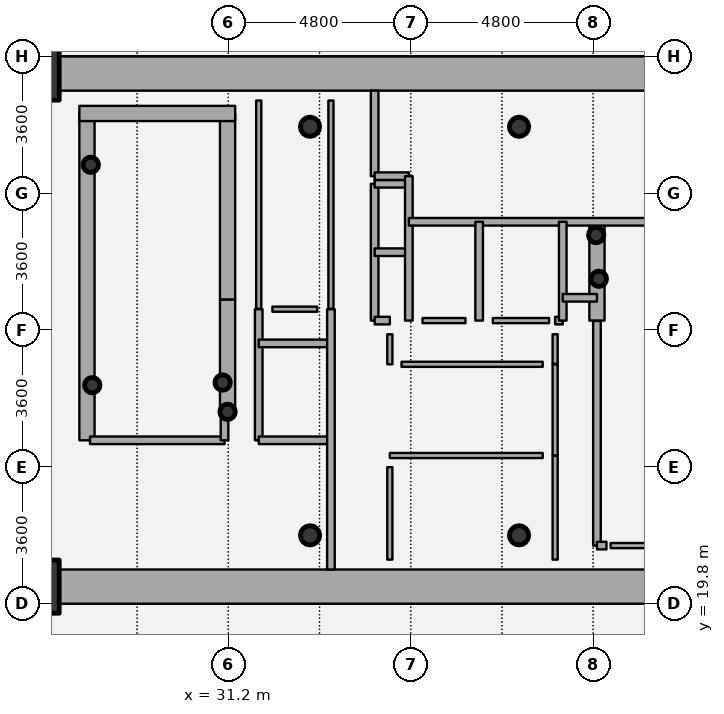
"""IFC4 building model, lengths in metres.
Left out: names, types, materials, properties, quantities, classifications, styles, units other than length and angle.
Written with IfcOpenShell. Run it as: python <this file> out.ifc"""

import sys

from ifc_helpers import new_model, si_unit, direction, frame, frame_2d, origin, origin_2d, place, context, subcontext, project, spatial, rectangle, hollow_circle, extrude, source, transform, mapped, element, fill, save


model = new_model("IFC4")
c1 = context("Model", 3, precision=1e-05, world=origin(), true_north=direction((0.0, 1.0)))
c2 = subcontext(c1, "Body", "Model", "MODEL_VIEW")
j1 = project(units=[si_unit("LENGTHUNIT", "METRE"), si_unit("PLANEANGLEUNIT", "RADIAN")], contexts=[c1])
p1 = place(None, origin())
s1 = spatial("IfcSite", under=j1, at=p1, CompositionType="ELEMENT")
p2 = place(p1, origin())
s2 = spatial("IfcBuilding", under=s1, at=p2, CompositionType="ELEMENT")
p3 = place(p2, frame((0.0, 0.0, -9.0)))
s3 = spatial("IfcBuildingStorey", under=s2, at=p3, CompositionType="ELEMENT", Elevation=-9.0)
for number, where, z_axis, x_axis in (
    (1, (26.05, 20.25, 0.0), (0.0, 0.0, 1.0), (1.0, 0.0, 0.0)),
    (2, (26.05, 33.75, 0.0), (0.0, 0.0, 1.0), (1.0, 0.0, 0.0)),
):
    element("IfcColumn", number, at=place(p3, frame(where, z_axis=z_axis, x_axis=x_axis)), inside=s3, PredefinedType="COLUMN", context=c2, shape_type="SweptSolid", body=[
        extrude(rectangle(XDim=1.4, YDim=1.4, at=origin_2d()), origin(), (0.0, 0.0, 1.0), 4.5),
    ])
for number, where, z_axis, x_axis in (
    (3, (33.35, 21.6, 0.0), (0.0, 0.0, 1.0), (1.0, 0.0, 0.0)),
    (4, (38.85, 21.6, 0.0), (0.0, 0.0, 1.0), (1.0, 0.0, 0.0)),
    (5, (38.85, 32.35, 0.0), (0.0, 0.0, 1.0), (1.0, 0.0, 0.0)),
    (6, (33.35, 32.35, 0.0), (0.0, 0.0, 1.0), (1.0, 0.0, 0.0)),
):
    element("IfcColumn", number, at=place(p3, frame(where, z_axis=z_axis, x_axis=x_axis)), inside=s3, PredefinedType="COLUMN", context=c2, shape_type="SweptSolid", body=[
        extrude(hollow_circle(Radius=0.254, WallThickness=0.02, at=origin_2d()), origin(), (0.0, 0.0, 1.0), 4.5),
    ])
p4 = place(p3, frame((27.48, 24.1, 0.0), z_axis=(0.0, 0.0, 1.0), x_axis=(0.0, 1.0, 0.0)))
e7 = element("IfcWall", 7, at=p4, inside=s3, PredefinedType="SHEAR", context=c2, shape_type="SweptSolid", body=[
    extrude(rectangle(XDim=8.6, YDim=0.4, at=frame_2d((4.3, 0.0))), origin(), (0.0, 0.0, 1.0), 4.5),
])
p5 = place(p3, frame((31.18, 27.8, 0.0), z_axis=(0.0, 0.0, 1.0), x_axis=(0.0, 1.0, 0.0)))
e8 = element("IfcWall", 8, at=p5, inside=s3, PredefinedType="SHEAR", context=c2, shape_type="SweptSolid", body=[
    extrude(rectangle(XDim=4.9, YDim=0.4, at=frame_2d((2.45, 0.0))), origin(), (0.0, 0.0, 1.0), 4.5),
])
p6 = place(p3, frame((27.28, 32.7, 0.0), z_axis=(0.0, 0.0, 1.0), x_axis=(1.0, 0.0, 0.0)))
e9 = element("IfcWall", 9, at=p6, inside=s3, PredefinedType="SHEAR", context=c2, shape_type="SweptSolid", body=[
    extrude(rectangle(XDim=4.1, YDim=0.4, at=frame_2d((2.05, 0.0))), origin(), (0.0, 0.0, 1.0), 4.5),
])
for number, where, z_axis, x_axis in (
    (10, (27.58, 31.35, 0.0), (0.0, 0.0, 1.0), (1.0, 0.0, 0.0)),
    (11, (31.05, 25.62, 0.0), (0.0, 0.0, 1.0), (1.0, 0.0, 0.0)),
    (12, (31.18, 24.85, 0.0), (0.0, 0.0, 1.0), (1.0, 0.0, 0.0)),
    (13, (27.62, 25.55, 0.0), (0.0, 0.0, 1.0), (1.0, 0.0, 0.0)),
    (14, (40.95, 28.35, 0.0), (0.0, 0.0, 1.0), (1.0, 0.0, 0.0)),
    (15, (40.88, 29.5, 0.0), (0.0, 0.0, 1.0), (1.0, 0.0, 0.0)),
):
    element("IfcColumn", number, at=place(p3, frame(where, z_axis=z_axis, x_axis=x_axis)), inside=s3, PredefinedType="COLUMN", context=c2, shape_type="SweptSolid", body=[
        extrude(hollow_circle(Radius=0.203, WallThickness=0.016, at=origin_2d()), origin(), (0.0, 0.0, 1.0), 4.5),
    ])
p7 = place(p3, frame((26.75, 33.75, 0.0), z_axis=(0.0, 0.0, 1.0), x_axis=(1.0, 0.0, 0.0)))
e16 = element("IfcWall", 16, at=p7, inside=s3, PredefinedType="SHEAR", context=c2, shape_type="SweptSolid", body=[
    extrude(rectangle(XDim=18.5, YDim=0.9, at=frame_2d((9.25, 0.0))), origin(), (0.0, 0.0, 1.0), 3.65),
])
p8 = place(p3, frame((45.25, 20.25, 0.0), z_axis=(0.0, 0.0, 1.0), x_axis=(-1.0, 0.0, 0.0)))
e17 = element("IfcWall", 17, at=p8, inside=s3, PredefinedType="SHEAR", context=c2, shape_type="SweptSolid", body=[
    extrude(rectangle(XDim=18.5, YDim=0.9, at=frame_2d((9.25, 0.0))), origin(), (0.0, 0.0, 1.0), 3.65),
])
p9 = place(p8, frame((10.0, 0.0, 0.0)))
e18 = element("IfcOpeningElement", 18, at=p9, cuts=e17, PredefinedType="OPENING", context=c2, shape_type="SweptSolid", body=[
    extrude(rectangle(XDim=1.15, YDim=2.15, at=origin_2d()), frame((0.575, 0.46, 1.075), z_axis=(0.0, -1.0, 0.0), x_axis=(1.0, 0.0, 0.0)), (0.0, 0.0, 1.0), 0.92),
])
p10 = place(p3, frame((31.18, 24.85, 0.0), z_axis=(0.0, 0.0, 1.0), x_axis=(0.0, 1.0, 0.0)))
e19 = element("IfcWall", 19, at=p10, inside=s3, PredefinedType="SHEAR", context=c2, shape_type="SweptSolid", body=[
    extrude(rectangle(XDim=2.95, YDim=0.4, at=frame_2d((1.475, 0.0))), origin(), (0.0, 0.0, 1.0), 3.8),
])
p11 = place(p3, frame((40.9, 27.25, 0.0), z_axis=(0.0, 0.0, 1.0), x_axis=(0.0, 1.0, 0.0)))
e20 = element("IfcWall", 20, at=p11, inside=s3, PredefinedType="SHEAR", context=c2, shape_type="SweptSolid", body=[
    extrude(rectangle(XDim=2.6, YDim=0.4, at=frame_2d((1.3, 0.0))), origin(), (0.0, 0.0, 1.0), 3.8),
])
p12 = place(p3, frame((27.56, 24.1, 0.0), z_axis=(0.0, 0.0, 1.0), x_axis=(1.0, 0.0, 0.0)))
e21 = element("IfcWall", 21, at=p12, inside=s3, PredefinedType="PARTITIONING", context=c2, shape_type="SweptSolid", body=[
    extrude(rectangle(XDim=3.54, YDim=0.2, at=frame_2d((1.77, 0.0))), origin(), (0.0, 0.0, 1.0), 4.2),
])
p13 = place(p12, frame((1.17, 0.0, 0.0)))
e22 = element("IfcOpeningElement", 22, at=p13, cuts=e21, PredefinedType="OPENING", context=c2, shape_type="SweptSolid", body=[
    extrude(rectangle(XDim=1.2, YDim=2.15, at=origin_2d()), frame((0.6, 0.11, 1.075), z_axis=(0.0, -1.0, 0.0), x_axis=(1.0, 0.0, 0.0)), (0.0, 0.0, 1.0), 0.22),
])
p14 = place(p3, frame((31.1, 24.1, 0.0), z_axis=(0.0, 0.0, 1.0), x_axis=(0.0, 1.0, 0.0)))
e23 = element("IfcWall", 23, at=p14, inside=s3, PredefinedType="PARTITIONING", context=c2, shape_type="SweptSolid", body=[
    extrude(rectangle(XDim=0.74, YDim=0.2, at=frame_2d((0.37, 0.0))), origin(), (0.0, 0.0, 1.0), 4.2),
])
p15 = place(p3, frame((32.0, 24.1, 0.0), z_axis=(0.0, 0.0, 1.0), x_axis=(0.0, 1.0, 0.0)))
e24 = element("IfcWall", 24, at=p15, inside=s3, PredefinedType="PARTITIONING", context=c2, shape_type="SweptSolid", body=[
    extrude(rectangle(XDim=3.45, YDim=0.2, at=frame_2d((1.725, 0.0))), origin(), (0.0, 0.0, 1.0), 4.2),
])
p16 = place(p3, frame((32.0, 24.1, 0.0), z_axis=(0.0, 0.0, 1.0), x_axis=(1.0, 0.0, 0.0)))
e25 = element("IfcWall", 25, at=p16, inside=s3, PredefinedType="PARTITIONING", context=c2, shape_type="SweptSolid", body=[
    extrude(rectangle(XDim=1.9, YDim=0.2, at=frame_2d((0.95, 0.0))), origin(), (0.0, 0.0, 1.0), 3.785),
])
p17 = place(p16, frame((0.375, 0.0, 0.0)))
e26 = element("IfcOpeningElement", 26, at=p17, cuts=e25, PredefinedType="OPENING", context=c2, shape_type="SweptSolid", body=[
    extrude(rectangle(XDim=1.15, YDim=2.15, at=origin_2d()), frame((0.575, 0.11, 1.075), z_axis=(0.0, -1.0, 0.0), x_axis=(1.0, 0.0, 0.0)), (0.0, 0.0, 1.0), 0.22),
])
p18 = place(p3, frame((32.0, 26.65, 0.0), z_axis=(0.0, 0.0, 1.0), x_axis=(1.0, 0.0, 0.0)))
e27 = element("IfcWall", 27, at=p18, inside=s3, PredefinedType="PARTITIONING", context=c2, shape_type="SweptSolid", body=[
    extrude(rectangle(XDim=1.9, YDim=0.2, at=frame_2d((0.95, 0.0))), origin(), (0.0, 0.0, 1.0), 3.785),
])
p19 = place(p3, frame((33.9, 20.7, 0.0), z_axis=(0.0, 0.0, 1.0), x_axis=(0.0, 1.0, 0.0)))
e28 = element("IfcWall", 28, at=p19, inside=s3, PredefinedType="PARTITIONING", context=c2, shape_type="SweptSolid", body=[
    extrude(rectangle(XDim=6.85, YDim=0.2, at=frame_2d((3.425, 0.0))), origin(), (0.0, 0.0, 1.0), 3.785),
])
p20 = place(p3, frame((35.05, 27.25, 0.0), z_axis=(0.0, 0.0, 1.0), x_axis=(0.0, 1.0, 0.0)))
e29 = element("IfcWall", 29, at=p20, inside=s3, PredefinedType="PARTITIONING", context=c2, shape_type="SweptSolid", body=[
    extrude(rectangle(XDim=3.6, YDim=0.2, at=frame_2d((1.8, 0.0))), origin(), (0.0, 0.0, 1.0), 4.2),
])
p21 = place(p20, frame((0.59, 0.0, 0.0)))
e30 = element("IfcOpeningElement", 30, at=p21, cuts=e29, PredefinedType="OPENING", context=c2, shape_type="SweptSolid", body=[
    extrude(rectangle(XDim=0.66, YDim=2.05, at=origin_2d()), frame((0.33, 0.11, 1.025), z_axis=(0.0, -1.0, 0.0), x_axis=(1.0, 0.0, 0.0)), (0.0, 0.0, 1.0), 0.22),
])
p22 = place(p20, frame((2.35, 0.0, 0.0)))
e31 = element("IfcOpeningElement", 31, at=p22, cuts=e29, PredefinedType="OPENING", context=c2, shape_type="SweptSolid", body=[
    extrude(rectangle(XDim=0.66, YDim=2.05, at=origin_2d()), frame((0.33, 0.11, 1.025), z_axis=(0.0, -1.0, 0.0), x_axis=(1.0, 0.0, 0.0)), (0.0, 0.0, 1.0), 0.22),
])
p23 = place(p3, frame((35.05, 27.25, 0.0), z_axis=(0.0, 0.0, 1.0), x_axis=(1.0, 0.0, 0.0)))
e32 = element("IfcWall", 32, at=p23, inside=s3, PredefinedType="PARTITIONING", context=c2, shape_type="SweptSolid", body=[
    extrude(rectangle(XDim=0.4, YDim=0.2, at=frame_2d((0.2, 0.0))), origin(), (0.0, 0.0, 1.0), 4.2),
])
for number, where, z_axis, x_axis in (
    (33, (35.05, 29.05, 0.0), (0.0, 0.0, 1.0), (1.0, 0.0, 0.0)),
    (34, (35.05, 30.85, 0.0), (0.0, 0.0, 1.0), (1.0, 0.0, 0.0)),
):
    element("IfcWall", number, at=place(p3, frame(where, z_axis=z_axis, x_axis=x_axis)), inside=s3, PredefinedType="PARTITIONING", context=c2, shape_type="SweptSolid", body=[
        extrude(rectangle(XDim=0.9, YDim=0.2, at=frame_2d((0.45, 0.0))), origin(), (0.0, 0.0, 1.0), 4.2),
    ])
p24 = place(p3, frame((35.05, 31.05, 0.0), z_axis=(0.0, 0.0, 1.0), x_axis=(0.0, 1.0, 0.0)))
e35 = element("IfcWall", 35, at=p24, inside=s3, PredefinedType="PARTITIONING", context=c2, shape_type="SweptSolid", body=[
    extrude(rectangle(XDim=2.25, YDim=0.2, at=frame_2d((1.125, 0.0))), origin(), (0.0, 0.0, 1.0), 3.785),
])
p25 = place(p3, frame((35.05, 31.05, 0.0), z_axis=(0.0, 0.0, 1.0), x_axis=(1.0, 0.0, 0.0)))
e36 = element("IfcWall", 36, at=p25, inside=s3, PredefinedType="PARTITIONING", context=c2, shape_type="SweptSolid", body=[
    extrude(rectangle(XDim=0.9, YDim=0.2, at=frame_2d((0.45, 0.0))), origin(), (0.0, 0.0, 1.0), 4.2),
])
p26 = place(p3, frame((35.95, 27.25, 0.0), z_axis=(0.0, 0.0, 1.0), x_axis=(0.0, 1.0, 0.0)))
e37 = element("IfcWall", 37, at=p26, inside=s3, PredefinedType="PARTITIONING", context=c2, shape_type="SweptSolid", body=[
    extrude(rectangle(XDim=3.8, YDim=0.2, at=frame_2d((1.9, 0.0))), origin(), (0.0, 0.0, 1.0), 4.2),
])
p27 = place(p3, frame((35.95, 29.85, 0.0), z_axis=(0.0, 0.0, 1.0), x_axis=(1.0, 0.0, 0.0)))
e38 = element("IfcWall", 38, at=p27, inside=s3, PredefinedType="PARTITIONING", context=c2, shape_type="SweptSolid", body=[
    extrude(rectangle(XDim=8.49, YDim=0.2, at=frame_2d((4.245, 0.0))), origin(), (0.0, 0.0, 1.0), 3.785),
])
p28 = place(p27, frame((6.1, 0.0, 0.0)))
e39 = element("IfcOpeningElement", 39, at=p28, cuts=e38, PredefinedType="OPENING", context=c2, shape_type="SweptSolid", body=[
    extrude(rectangle(XDim=1.2, YDim=2.15, at=origin_2d()), frame((0.6, 0.11, 1.075), z_axis=(0.0, -1.0, 0.0), x_axis=(1.0, 0.0, 0.0)), (0.0, 0.0, 1.0), 0.22),
])
p29 = place(p27, frame((0.37, 0.0, 0.0)))
e40 = element("IfcOpeningElement", 40, at=p29, cuts=e38, PredefinedType="OPENING", context=c2, shape_type="SweptSolid", body=[
    extrude(rectangle(XDim=1.15, YDim=2.15, at=origin_2d()), frame((0.575, 0.11, 1.075), z_axis=(0.0, -1.0, 0.0), x_axis=(1.0, 0.0, 0.0)), (0.0, 0.0, 1.0), 0.22),
])
p30 = place(p27, frame((2.425, 0.0, 0.0)))
e41 = element("IfcOpeningElement", 41, at=p30, cuts=e38, PredefinedType="OPENING", context=c2, shape_type="SweptSolid", body=[
    extrude(rectangle(XDim=1.05, YDim=2.15, at=origin_2d()), frame((0.525, 0.11, 1.075), z_axis=(0.0, -1.0, 0.0), x_axis=(1.0, 0.0, 0.0)), (0.0, 0.0, 1.0), 0.22),
])
p31 = place(p3, frame((37.8, 27.25, 0.0), z_axis=(0.0, 0.0, 1.0), x_axis=(0.0, 1.0, 0.0)))
e42 = element("IfcWall", 42, at=p31, inside=s3, PredefinedType="PARTITIONING", context=c2, shape_type="SweptSolid", body=[
    extrude(rectangle(XDim=2.6, YDim=0.2, at=frame_2d((1.3, 0.0))), origin(), (0.0, 0.0, 1.0), 4.2),
])
p32 = place(p3, frame((39.8, 23.7, 0.0), z_axis=(0.0, 0.0, 1.0), x_axis=(0.0, 1.0, 0.0)))
e43 = element("IfcWall", 43, at=p32, inside=s3, PredefinedType="PARTITIONING", context=c2, shape_type="SweptSolid", body=[
    extrude(rectangle(XDim=2.4, YDim=0.135, at=frame_2d((1.2, 0.0))), origin(), (0.0, 0.0, 1.0), 4.2),
])
p33 = place(p32, frame((0.79, 0.0, 0.0)))
e44 = element("IfcOpeningElement", 44, at=p33, cuts=e43, PredefinedType="OPENING", context=c2, shape_type="SweptSolid", body=[
    extrude(rectangle(XDim=0.82, YDim=2.1, at=origin_2d()), frame((0.41, 0.078, 1.05), z_axis=(0.0, -1.0, 0.0), x_axis=(1.0, 0.0, 0.0)), (0.0, 0.0, 1.0), 0.155),
])
p34 = place(p3, frame((39.8, 27.25, 0.0), z_axis=(0.0, 0.0, 1.0), x_axis=(1.0, 0.0, 0.0)))
e45 = element("IfcWall", 45, at=p34, inside=s3, PredefinedType="PARTITIONING", context=c2, shape_type="SweptSolid", body=[
    extrude(rectangle(XDim=0.2, YDim=0.2, at=frame_2d((0.1, 0.0))), origin(), (0.0, 0.0, 1.0), 4.2),
])
p35 = place(p3, frame((40.0, 27.25, 0.0), z_axis=(0.0, 0.0, 1.0), x_axis=(0.0, 1.0, 0.0)))
e46 = element("IfcWall", 46, at=p35, inside=s3, PredefinedType="PARTITIONING", context=c2, shape_type="SweptSolid", body=[
    extrude(rectangle(XDim=2.6, YDim=0.2, at=frame_2d((1.3, 0.0))), origin(), (0.0, 0.0, 1.0), 4.2),
])
p36 = place(p3, frame((40.0, 27.85, 0.0), z_axis=(0.0, 0.0, 1.0), x_axis=(1.0, 0.0, 0.0)))
e47 = element("IfcWall", 47, at=p36, inside=s3, PredefinedType="PARTITIONING", context=c2, shape_type="SweptSolid", body=[
    extrude(rectangle(XDim=0.9, YDim=0.2, at=frame_2d((0.45, 0.0))), origin(), (0.0, 0.0, 1.0), 4.2),
])
p37 = place(p3, frame((40.9, 21.33, 0.0), z_axis=(0.0, 0.0, 1.0), x_axis=(0.0, 1.0, 0.0)))
e48 = element("IfcWall", 48, at=p37, inside=s3, PredefinedType="PARTITIONING", context=c2, shape_type="SweptSolid", body=[
    extrude(rectangle(XDim=5.91, YDim=0.2, at=frame_2d((2.955, 0.0))), origin(), (0.0, 0.0, 1.0), 3.735),
])
p38 = place(p3, frame((40.9, 21.33, 0.0), z_axis=(0.0, 0.0, 1.0), x_axis=(1.0, 0.0, 0.0)))
e49 = element("IfcWall", 49, at=p38, inside=s3, PredefinedType="PARTITIONING", context=c2, shape_type="SweptSolid", body=[
    extrude(rectangle(XDim=0.25, YDim=0.2, at=frame_2d((0.125, 0.0))), origin(), (0.0, 0.0, 1.0), 3.735),
])
p39 = place(p3, frame((44.08, 21.33, 0.0), z_axis=(0.0, 0.0, 1.0), x_axis=(-1.0, 0.0, 0.0)))
e50 = element("IfcWall", 50, at=p39, inside=s3, PredefinedType="PARTITIONING", context=c2, shape_type="SweptSolid", body=[
    extrude(rectangle(XDim=2.82, YDim=0.135, at=frame_2d((1.41, 0.0))), origin(), (0.0, 0.0, 1.0), 3.735),
])
p40 = place(p3, frame((37.44, 27.25, 0.0), z_axis=(0.0, 0.0, 1.0), x_axis=(-1.0, 0.0, 0.0)))
e51 = element("IfcWall", 51, at=p40, inside=s3, PredefinedType="PARTITIONING", context=c2, shape_type="SweptSolid", body=[
    extrude(rectangle(XDim=1.13, YDim=0.135, at=frame_2d((0.565, 0.0))), origin(), (0.0, 0.0, 1.0), 4.2),
])
p41 = place(p3, frame((39.64, 27.25, 0.0), z_axis=(0.0, 0.0, 1.0), x_axis=(-1.0, 0.0, 0.0)))
e52 = element("IfcWall", 52, at=p41, inside=s3, PredefinedType="PARTITIONING", context=c2, shape_type="SweptSolid", body=[
    extrude(rectangle(XDim=1.48, YDim=0.135, at=frame_2d((0.74, 0.0))), origin(), (0.0, 0.0, 1.0), 3.785),
])
p42 = place(p3, frame((32.36, 27.55, 0.0), z_axis=(0.0, 0.0, 1.0), x_axis=(1.0, 0.0, 0.0)))
e53 = element("IfcWall", 53, at=p42, inside=s3, PredefinedType="PARTITIONING", context=c2, shape_type="SweptSolid", body=[
    extrude(rectangle(XDim=1.18, YDim=0.135, at=frame_2d((0.59, 0.0))), origin(), (0.0, 0.0, 1.0), 3.785),
])
p43 = place(p3, frame((39.8, 20.96, 0.0), z_axis=(0.0, 0.0, 1.0), x_axis=(0.0, 1.0, 0.0)))
e54 = element("IfcWall", 54, at=p43, inside=s3, PredefinedType="PARTITIONING", context=c2, shape_type="SweptSolid", body=[
    extrude(rectangle(XDim=2.73, YDim=0.135, at=frame_2d((1.365, 0.0))), origin(), (0.0, 0.0, 1.0), 3.735),
])
p44 = place(p3, frame((39.8, 26.11, 0.0), z_axis=(0.0, 0.0, 1.0), x_axis=(0.0, 1.0, 0.0)))
e55 = element("IfcWall", 55, at=p44, inside=s3, PredefinedType="PARTITIONING", context=c2, shape_type="SweptSolid", body=[
    extrude(rectangle(XDim=0.78, YDim=0.135, at=frame_2d((0.39, 0.0))), origin(), (0.0, 0.0, 1.0), 4.2),
])
p45 = place(p3, frame((32.0, 33.04, 0.0), z_axis=(0.0, 0.0, 1.0), x_axis=(0.0, -1.0, 0.0)))
e56 = element("IfcWall", 56, at=p45, inside=s3, PredefinedType="PARTITIONING", context=c2, shape_type="SweptSolid", body=[
    extrude(rectangle(XDim=5.48, YDim=0.135, at=frame_2d((2.74, 0.0))), origin(), (0.0, 0.0, 1.0), 3.735),
])
p46 = place(p3, frame((35.45, 26.89, 0.0), z_axis=(0.0, 0.0, 1.0), x_axis=(0.0, -1.0, 0.0)))
e57 = element("IfcWall", 57, at=p46, inside=s3, PredefinedType="PARTITIONING", context=c2, shape_type="SweptSolid", body=[
    extrude(rectangle(XDim=0.79, YDim=0.135, at=frame_2d((0.395, 0.0))), origin(), (0.0, 0.0, 1.0), 4.2),
])
p47 = place(p3, frame((35.758, 26.1, 0.0), z_axis=(0.0, 0.0, 1.0), x_axis=(1.0, 0.0, 0.0)))
e58 = element("IfcWall", 58, at=p47, inside=s3, PredefinedType="PARTITIONING", context=c2, shape_type="SweptSolid", body=[
    extrude(rectangle(XDim=3.715, YDim=0.135, at=frame_2d((1.857, 0.0))), origin(), (0.0, 0.0, 1.0), 3.785),
])
p48 = place(p3, frame((39.472, 23.7, 0.0), z_axis=(0.0, 0.0, 1.0), x_axis=(-1.0, 0.0, 0.0)))
e59 = element("IfcWall", 59, at=p48, inside=s3, PredefinedType="PARTITIONING", context=c2, shape_type="SweptSolid", body=[
    extrude(rectangle(XDim=4.022, YDim=0.135, at=frame_2d((2.011, 0.0))), origin(), (0.0, 0.0, 1.0), 3.785),
])
p49 = place(p3, frame((35.45, 23.393, 0.0), z_axis=(0.0, 0.0, 1.0), x_axis=(0.0, -1.0, 0.0)))
e60 = element("IfcWall", 60, at=p49, inside=s3, PredefinedType="PARTITIONING", context=c2, shape_type="SweptSolid", body=[
    extrude(rectangle(XDim=2.433, YDim=0.135, at=frame_2d((1.216, 0.0))), origin(), (0.0, 0.0, 1.0), 3.785),
])
p50 = place(p3, frame((33.9, 27.56, 0.0), z_axis=(0.0, 0.0, 1.0), x_axis=(0.0, 1.0, 0.0)))
e61 = element("IfcWall", 61, at=p50, inside=s3, PredefinedType="PARTITIONING", context=c2, shape_type="SweptSolid", body=[
    extrude(rectangle(XDim=5.48, YDim=0.135, at=frame_2d((2.74, 0.0))), origin(), (0.0, 0.0, 1.0), 3.785),
])
m1 = source(origin(), c2, "Body", "SweptSolid", [
    extrude(rectangle(XDim=1.15, YDim=2.15, at=origin_2d()), frame((0.575, 0.025, 1.075), z_axis=(0.0, -1.0, 0.0), x_axis=(1.0, 0.0, 0.0)), (0.0, 0.0, 1.0), 0.05),
])
p51 = place(p9, origin())
e62 = element("IfcDoor", 62, at=p51, inside=s3, OperationType="SINGLE_SWING_RIGHT", PredefinedType="DOOR", context=c2, shape_type="MappedRepresentation", body=[
    mapped(m1, transform((0.0, 0.0, 0.0), x_axis=(1.0, 0.0, 0.0), y_axis=(0.0, 1.0, 0.0), z_axis=(0.0, 0.0, 1.0), scale=1.0)),
])
fill(e18, e62)
m2 = source(origin(), c2, "Body", "SweptSolid", [
    extrude(rectangle(XDim=1.2, YDim=2.15, at=origin_2d()), frame((0.6, 0.025, 1.075), z_axis=(0.0, -1.0, 0.0), x_axis=(1.0, 0.0, 0.0)), (0.0, 0.0, 1.0), 0.05),
])
p52 = place(p13, origin())
e63 = element("IfcDoor", 63, at=p52, inside=s3, OperationType="SINGLE_SWING_LEFT", PredefinedType="DOOR", context=c2, shape_type="MappedRepresentation", body=[
    mapped(m2, transform((0.0, 0.0, 0.0), x_axis=(1.0, 0.0, 0.0), y_axis=(0.0, 1.0, 0.0), z_axis=(0.0, 0.0, 1.0), scale=1.0)),
])
fill(e22, e63)
p53 = place(p28, origin())
e64 = element("IfcDoor", 64, at=p53, inside=s3, OperationType="SINGLE_SWING_RIGHT", PredefinedType="DOOR", context=c2, shape_type="MappedRepresentation", body=[
    mapped(m2, transform((0.0, 0.0, 0.0), x_axis=(1.0, 0.0, 0.0), y_axis=(0.0, 1.0, 0.0), z_axis=(0.0, 0.0, 1.0), scale=1.0)),
])
fill(e39, e64)
m3 = source(origin(), c2, "Body", "SweptSolid", [
    extrude(rectangle(XDim=1.15, YDim=2.15, at=origin_2d()), frame((0.575, 0.025, 1.075), z_axis=(0.0, -1.0, 0.0), x_axis=(1.0, 0.0, 0.0)), (0.0, 0.0, 1.0), 0.05),
])
p54 = place(p29, origin())
e65 = element("IfcDoor", 65, at=p54, inside=s3, OperationType="DOUBLE_DOOR_SLIDING", PredefinedType="USERDEFINED", context=c2, shape_type="MappedRepresentation", body=[
    mapped(m3, transform((0.0, 0.0, 0.0), x_axis=(1.0, 0.0, 0.0), y_axis=(0.0, 1.0, 0.0), z_axis=(0.0, 0.0, 1.0), scale=1.0)),
])
fill(e40, e65)
p55 = place(p17, origin())
e66 = element("IfcDoor", 66, at=p55, inside=s3, OperationType="DOUBLE_DOOR_SLIDING", PredefinedType="USERDEFINED", context=c2, shape_type="MappedRepresentation", body=[
    mapped(m3, transform((0.0, 0.0, 0.0), x_axis=(1.0, 0.0, 0.0), y_axis=(0.0, 1.0, 0.0), z_axis=(0.0, 0.0, 1.0), scale=1.0)),
])
fill(e26, e66)
m4 = source(origin(), c2, "Body", "SweptSolid", [
    extrude(rectangle(XDim=1.05, YDim=2.15, at=origin_2d()), frame((0.525, 0.025, 1.075), z_axis=(0.0, -1.0, 0.0), x_axis=(1.0, 0.0, 0.0)), (0.0, 0.0, 1.0), 0.05),
])
p56 = place(p30, origin())
e67 = element("IfcDoor", 67, at=p56, inside=s3, OperationType="DOUBLE_DOOR_SLIDING", PredefinedType="USERDEFINED", context=c2, shape_type="MappedRepresentation", body=[
    mapped(m4, transform((0.0, 0.0, 0.0), x_axis=(1.0, 0.0, 0.0), y_axis=(0.0, 1.0, 0.0), z_axis=(0.0, 0.0, 1.0), scale=1.0)),
])
fill(e41, e67)
m5 = source(origin(), c2, "Body", "SweptSolid", [
    extrude(rectangle(XDim=0.66, YDim=2.05, at=origin_2d()), frame((0.33, 0.025, 1.025), z_axis=(0.0, -1.0, 0.0), x_axis=(1.0, 0.0, 0.0)), (0.0, 0.0, 1.0), 0.05),
])
p57 = place(p21, origin())
e68 = element("IfcDoor", 68, at=p57, inside=s3, OperationType="SINGLE_SWING_RIGHT", PredefinedType="USERDEFINED", context=c2, shape_type="MappedRepresentation", body=[
    mapped(m5, transform((0.0, 0.0, 0.0), x_axis=(1.0, 0.0, 0.0), y_axis=(0.0, 1.0, 0.0), z_axis=(0.0, 0.0, 1.0), scale=1.0)),
])
fill(e30, e68)
p58 = place(p22, origin())
e69 = element("IfcDoor", 69, at=p58, inside=s3, OperationType="SINGLE_SWING_LEFT", PredefinedType="USERDEFINED", context=c2, shape_type="MappedRepresentation", body=[
    mapped(m5, transform((0.0, 0.0, 0.0), x_axis=(1.0, 0.0, 0.0), y_axis=(0.0, 1.0, 0.0), z_axis=(0.0, 0.0, 1.0), scale=1.0)),
])
fill(e31, e69)
m6 = source(origin(), c2, "Body", "SweptSolid", [
    extrude(rectangle(XDim=0.82, YDim=2.1, at=origin_2d()), frame((0.41, 0.025, 1.05), z_axis=(0.0, -1.0, 0.0), x_axis=(1.0, 0.0, 0.0)), (0.0, 0.0, 1.0), 0.05),
])
p59 = place(p33, origin())
e70 = element("IfcDoor", 70, at=p59, inside=s3, OperationType="SINGLE_SWING_RIGHT", PredefinedType="DOOR", context=c2, shape_type="MappedRepresentation", body=[
    mapped(m6, transform((0.0, 0.0, 0.0), x_axis=(1.0, 0.0, 0.0), y_axis=(0.0, 1.0, 0.0), z_axis=(0.0, 0.0, 1.0), scale=1.0)),
])
fill(e44, e70)
save(model, sys.argv[1])
